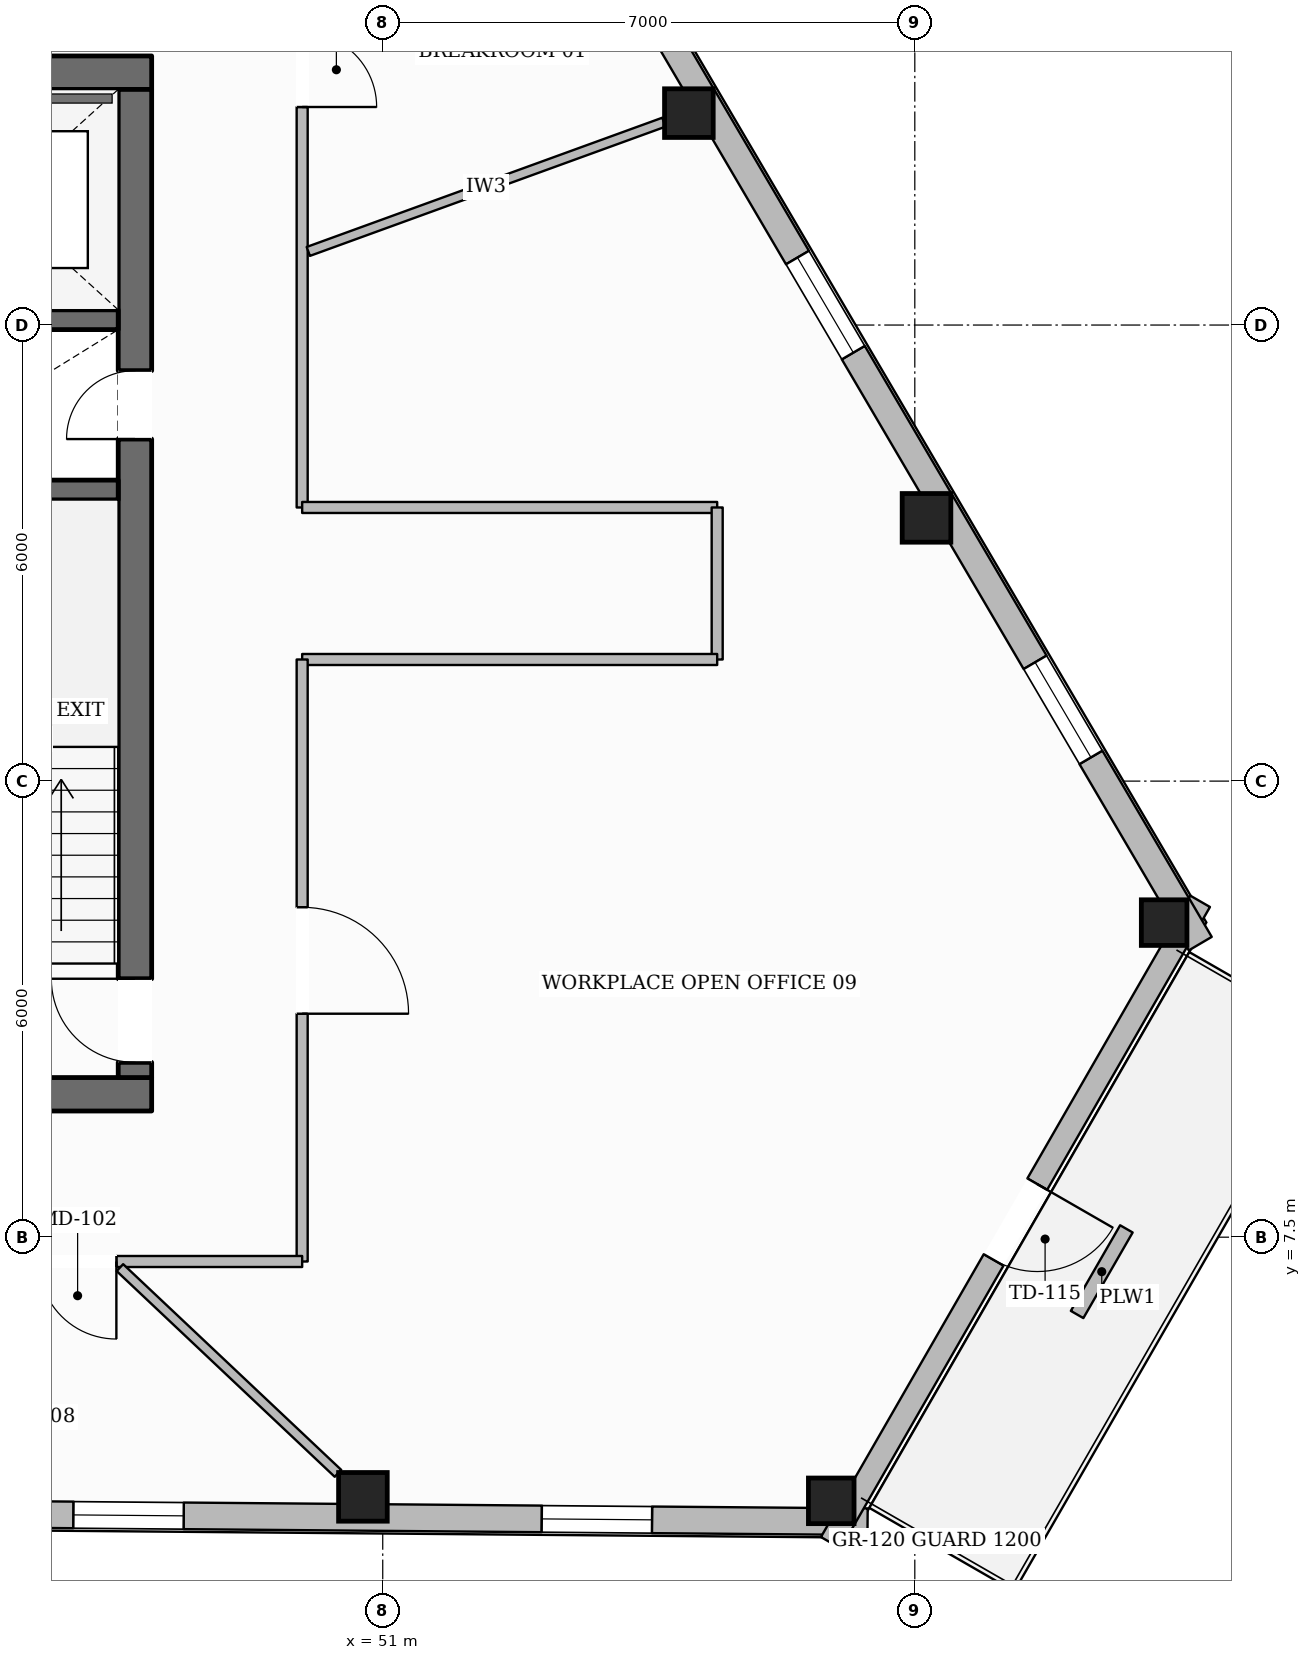
"""IFC4 building model, lengths in metres.
Left out: names, types, materials, properties, quantities, classifications, styles, units other than length and angle.
Written with IfcOpenShell. Run it as: python <this file> out.ifc"""

import sys

from ifc_helpers import new_model, si_unit, direction, frame, frame_2d, origin, origin_2d, place, context, subcontext, project, spatial, rectangle, hollow_rectangle, extrude, element, fill, save


model = new_model("IFC4")
c1 = context("Model", 3, precision=1e-05, world=origin(), true_north=direction((0.0, 1.0)))
c2 = subcontext(c1, "Body", "Model", "MODEL_VIEW")
j1 = project(units=[si_unit("LENGTHUNIT", "METRE"), si_unit("PLANEANGLEUNIT", "RADIAN")], contexts=[c1])
p1 = place(None, origin())
s1 = spatial("IfcSite", under=j1, at=p1, CompositionType="ELEMENT")
p2 = place(p1, origin())
s2 = spatial("IfcBuilding", under=s1, at=p2, CompositionType="ELEMENT")
p3 = place(p2, frame((0.0, 0.0, 191.95)))
s3 = spatial("IfcBuildingStorey", under=s2, at=p3, CompositionType="ELEMENT", Elevation=191.95)
p4 = place(p3, frame((28.04, 9.38, 0.0), z_axis=(0.0, 0.0, 1.0), x_axis=(1.0, 0.0, 0.0)))
e1 = element("IfcWall", 1, at=p4, inside=s3, PredefinedType="SOLIDWALL", context=c2, shape_type="SweptSolid", body=[
    extrude(rectangle(XDim=19.92, YDim=0.44, at=frame_2d((9.96, 0.0))), origin(), (0.0, 0.0, 1.0), 3.6),
])
p5 = place(p4, frame((10.46, 0.0, 0.0)))
e2 = element("IfcOpeningElement", 2, at=p5, cuts=e1, PredefinedType="OPENING", context=c2, shape_type="SweptSolid", body=[
    extrude(rectangle(XDim=1.4, YDim=2.2, at=frame_2d((0.7, 1.1))), frame((0.0, 0.23, 0.0), z_axis=(0.0, -1.0, 0.0), x_axis=(1.0, 0.0, 0.0)), (0.0, 0.0, 1.0), 0.46),
])
p6 = place(p3, frame((28.04, 22.82, 0.0), z_axis=(0.0, 0.0, 1.0), x_axis=(1.0, 0.0, 0.0)))
e3 = element("IfcWall", 3, at=p6, inside=s3, PredefinedType="SOLIDWALL", context=c2, shape_type="SweptSolid", body=[
    extrude(rectangle(XDim=19.92, YDim=0.44, at=frame_2d((9.96, 0.0))), origin(), (0.0, 0.0, 1.0), 3.6),
])
p7 = place(p6, frame((6.235, 0.0, 0.0)))
e4 = element("IfcOpeningElement", 4, at=p7, cuts=e3, PredefinedType="OPENING", context=c2, shape_type="SweptSolid", body=[
    extrude(rectangle(XDim=1.05, YDim=2.15, at=frame_2d((0.525, 1.075))), frame((0.0, 0.23, 0.0), z_axis=(0.0, -1.0, 0.0), x_axis=(1.0, 0.0, 0.0)), (0.0, 0.0, 1.0), 0.46),
])
p8 = place(p6, frame((12.635, 0.0, 0.0)))
e5 = element("IfcOpeningElement", 5, at=p8, cuts=e3, PredefinedType="OPENING", context=c2, shape_type="SweptSolid", body=[
    extrude(rectangle(XDim=1.05, YDim=2.15, at=frame_2d((0.525, 1.075))), frame((0.0, 0.23, 0.0), z_axis=(0.0, -1.0, 0.0), x_axis=(1.0, 0.0, 0.0)), (0.0, 0.0, 1.0), 0.46),
])
p9 = place(p3, frame((47.74, 9.6, 0.0), z_axis=(0.0, 0.0, 1.0), x_axis=(0.0, 1.0, 0.0)))
e6 = element("IfcWall", 6, at=p9, inside=s3, PredefinedType="SOLIDWALL", context=c2, shape_type="SweptSolid", body=[
    extrude(rectangle(XDim=13.0, YDim=0.44, at=frame_2d((6.5, 0.0))), origin(), (0.0, 0.0, 1.0), 3.6),
])
p10 = place(p9, frame((0.2, 0.0, 0.0)))
e7 = element("IfcOpeningElement", 7, at=p10, cuts=e6, PredefinedType="OPENING", context=c2, shape_type="SweptSolid", body=[
    extrude(rectangle(XDim=1.1, YDim=2.15, at=frame_2d((0.55, 1.075))), frame((0.0, 0.23, 0.0), z_axis=(0.0, -1.0, 0.0), x_axis=(1.0, 0.0, 0.0)), (0.0, 0.0, 1.0), 0.46),
])
p11 = place(p9, frame((8.4, 0.0, 0.0)))
e8 = element("IfcOpeningElement", 8, at=p11, cuts=e6, PredefinedType="OPENING", context=c2, shape_type="SweptSolid", body=[
    extrude(rectangle(XDim=0.9, YDim=2.1, at=frame_2d((0.45, 1.05))), frame((0.0, 0.23, 0.0), z_axis=(0.0, -1.0, 0.0), x_axis=(1.0, 0.0, 0.0)), (0.0, 0.0, 1.0), 0.46),
])
for number, where, z_axis, x_axis in (
    (9, (44.32, 17.33, 0.0), (0.0, 0.0, 1.0), (1.0, 0.0, 0.0)),
    (10, (44.32, 19.57, 0.0), (0.0, 0.0, 1.0), (1.0, 0.0, 0.0)),
):
    element("IfcWall", number, at=place(p3, frame(where, z_axis=z_axis, x_axis=x_axis)), inside=s3, PredefinedType="SHEAR", context=c2, shape_type="SweptSolid", body=[
        extrude(rectangle(XDim=3.2, YDim=0.26, at=frame_2d((1.6, 0.0))), origin(), (0.0, 0.0, 1.0), 3.6),
    ])
p12 = place(p3, frame((50.739, 4.084, 0.0), z_axis=(0.0, 0.0, 1.0), x_axis=(1.0, 0.0, 0.0)))
e11 = element("IfcColumn", 11, at=p12, inside=s3, PredefinedType="COLUMN", context=c2, shape_type="SweptSolid", body=[
    extrude(hollow_rectangle(XDim=0.64, YDim=0.64, WallThickness=0.028, at=origin_2d()), origin(), (0.0, 0.0, 1.0), 3.6),
])
for number, where, z_axis, x_axis in (
    (12, (56.901, 4.031, 0.0), (0.0, 0.0, 1.0), (1.0, 0.0, 0.0)),
    (13, (61.28, 11.638, 0.0), (0.0, 0.0, 1.0), (1.0, 0.0, 0.0)),
):
    element("IfcColumn", number, at=place(p3, frame(where, z_axis=z_axis, x_axis=x_axis)), inside=s3, PredefinedType="COLUMN", context=c2, shape_type="SweptSolid", body=[
        extrude(hollow_rectangle(XDim=0.6, YDim=0.6, WallThickness=0.028, at=origin_2d()), origin(), (0.0, 0.0, 1.0), 3.6),
    ])
for number, where, z_axis, x_axis in (
    (14, (58.154, 16.963, 0.0), (0.0, 0.0, 1.0), (1.0, 0.0, 0.0)),
    (15, (55.028, 22.288, 0.0), (0.0, 0.0, 1.0), (1.0, 0.0, 0.0)),
):
    element("IfcColumn", number, at=place(p3, frame(where, z_axis=z_axis, x_axis=x_axis)), inside=s3, PredefinedType="COLUMN", context=c2, shape_type="SweptSolid", body=[
        extrude(hollow_rectangle(XDim=0.64, YDim=0.64, WallThickness=0.028, at=origin_2d()), origin(), (0.0, 0.0, 1.0), 3.6),
    ])
p13 = place(p3, frame((57.379, 3.757, 0.0), z_axis=(0.0, 0.0, 1.0), x_axis=(-0.999963726544, 0.008517370208, 0.0)))
e16 = element("IfcWall", 16, at=p13, inside=s3, PredefinedType="STANDARD", context=c2, shape_type="SweptSolid", body=[
    extrude(rectangle(XDim=37.922, YDim=0.35, at=frame_2d((18.961, 0.0))), origin(), (0.0, 0.0, 1.0), 3.132),
])
p14 = place(p13, frame((27.842, 0.0, 0.0)))
e17 = element("IfcOpeningElement", 17, at=p14, cuts=e16, PredefinedType="OPENING", context=c2, shape_type="SweptSolid", body=[
    extrude(rectangle(XDim=1.0, YDim=2.2, at=frame_2d((0.5, 1.1))), frame((0.0, 0.185, 0.0), z_axis=(0.0, -1.0, 0.0), x_axis=(1.0, 0.0, 0.0)), (0.0, 0.0, 1.0), 0.37),
])
p15 = place(p13, frame((33.644, 0.0, 0.65)))
e18 = element("IfcOpeningElement", 18, at=p15, cuts=e16, PredefinedType="OPENING", context=c2, shape_type="SweptSolid", body=[
    extrude(rectangle(XDim=1.45, YDim=1.75, at=frame_2d((0.725, 0.875))), frame((0.0, 0.185, 0.0), z_axis=(0.0, -1.0, 0.0), x_axis=(1.0, 0.0, 0.0)), (0.0, 0.0, 1.0), 0.37),
])
p16 = place(p13, frame((21.321, 0.0, 0.65)))
e19 = element("IfcOpeningElement", 19, at=p16, cuts=e16, PredefinedType="OPENING", context=c2, shape_type="SweptSolid", body=[
    extrude(rectangle(XDim=1.45, YDim=1.75, at=frame_2d((0.725, 0.875))), frame((0.0, 0.185, 0.0), z_axis=(0.0, -1.0, 0.0), x_axis=(1.0, 0.0, 0.0)), (0.0, 0.0, 1.0), 0.37),
])
p17 = place(p13, frame((8.998, 0.0, 0.65)))
e20 = element("IfcOpeningElement", 20, at=p17, cuts=e16, PredefinedType="OPENING", context=c2, shape_type="SweptSolid", body=[
    extrude(rectangle(XDim=1.45, YDim=1.75, at=frame_2d((0.725, 0.875))), frame((0.0, 0.185, 0.0), z_axis=(0.0, -1.0, 0.0), x_axis=(1.0, 0.0, 0.0)), (0.0, 0.0, 1.0), 0.37),
])
p18 = place(p13, frame((2.836, 0.0, 0.65)))
e21 = element("IfcOpeningElement", 21, at=p18, cuts=e16, PredefinedType="OPENING", context=c2, shape_type="SweptSolid", body=[
    extrude(rectangle(XDim=1.45, YDim=1.75, at=frame_2d((0.725, 0.875))), frame((0.0, 0.185, 0.0), z_axis=(0.0, -1.0, 0.0), x_axis=(1.0, 0.0, 0.0)), (0.0, 0.0, 1.0), 0.37),
])
p19 = place(p3, frame((61.753, 11.919, 0.0), z_axis=(0.0, 0.0, 1.0), x_axis=(-0.498955314761, -0.866627713538, 0.0)))
e22 = element("IfcWall", 22, at=p19, inside=s3, PredefinedType="STANDARD", context=c2, shape_type="SweptSolid", body=[
    extrude(rectangle(XDim=9.737, YDim=0.3, at=frame_2d((4.869, 0.0))), origin(), (0.0, 0.0, 1.0), 3.132),
])
p20 = place(p19, frame((4.294, 0.0, 0.0)))
e23 = element("IfcOpeningElement", 23, at=p20, cuts=e22, PredefinedType="OPENING", context=c2, shape_type="SweptSolid", body=[
    extrude(rectangle(XDim=1.15, YDim=2.2, at=frame_2d((0.575, 1.1))), frame((0.0, 0.16, 0.0), z_axis=(0.0, -1.0, 0.0), x_axis=(1.0, 0.0, 0.0)), (0.0, 0.0, 1.0), 0.32),
])
p21 = place(p3, frame((42.516, 44.131, 0.0), z_axis=(0.0, 0.0, 1.0), x_axis=(0.506310158323, -0.862351450152, 0.0)))
e24 = element("IfcWall", 24, at=p21, inside=s3, PredefinedType="STANDARD", context=c2, shape_type="SweptSolid", body=[
    extrude(rectangle(XDim=38.0, YDim=0.35, at=frame_2d((19.0, 0.0))), origin(), (0.0, 0.0, 1.0), 3.132),
])
p22 = place(p21, frame((33.708, 0.0, 0.65)))
e25 = element("IfcOpeningElement", 25, at=p22, cuts=e24, PredefinedType="OPENING", context=c2, shape_type="SweptSolid", body=[
    extrude(rectangle(XDim=1.45, YDim=1.75, at=frame_2d((0.725, 0.875))), frame((0.0, 0.185, 0.0), z_axis=(0.0, -1.0, 0.0), x_axis=(1.0, 0.0, 0.0)), (0.0, 0.0, 1.0), 0.37),
])
p23 = place(p21, frame((27.534, 0.0, 0.65)))
e26 = element("IfcOpeningElement", 26, at=p23, cuts=e24, PredefinedType="OPENING", context=c2, shape_type="SweptSolid", body=[
    extrude(rectangle(XDim=1.45, YDim=1.75, at=frame_2d((0.725, 0.875))), frame((0.0, 0.185, 0.0), z_axis=(0.0, -1.0, 0.0), x_axis=(1.0, 0.0, 0.0)), (0.0, 0.0, 1.0), 0.37),
])
p24 = place(p21, frame((21.359, 0.0, 0.65)))
e27 = element("IfcOpeningElement", 27, at=p24, cuts=e24, PredefinedType="OPENING", context=c2, shape_type="SweptSolid", body=[
    extrude(rectangle(XDim=1.45, YDim=1.75, at=frame_2d((0.725, 0.875))), frame((0.0, 0.185, 0.0), z_axis=(0.0, -1.0, 0.0), x_axis=(1.0, 0.0, 0.0)), (0.0, 0.0, 1.0), 0.37),
])
p25 = place(p21, frame((9.009, 0.0, 0.65)))
e28 = element("IfcOpeningElement", 28, at=p25, cuts=e24, PredefinedType="OPENING", context=c2, shape_type="SweptSolid", body=[
    extrude(rectangle(XDim=1.45, YDim=1.75, at=frame_2d((0.725, 0.875))), frame((0.0, 0.185, 0.0), z_axis=(0.0, -1.0, 0.0), x_axis=(1.0, 0.0, 0.0)), (0.0, 0.0, 1.0), 0.37),
])
p26 = place(p21, frame((2.834, 0.0, 0.65)))
e29 = element("IfcOpeningElement", 29, at=p26, cuts=e24, PredefinedType="OPENING", context=c2, shape_type="SweptSolid", body=[
    extrude(rectangle(XDim=1.45, YDim=1.75, at=frame_2d((0.725, 0.875))), frame((0.0, 0.185, 0.0), z_axis=(0.0, -1.0, 0.0), x_axis=(1.0, 0.0, 0.0)), (0.0, 0.0, 1.0), 0.37),
])
p27 = place(p3, frame((60.135, 6.483, 0.0), z_axis=(0.0, 0.0, 1.0), x_axis=(0.49894734977, 0.866632299281, 0.0)))
e30 = element("IfcWall", 30, at=p27, inside=s3, PredefinedType="USERDEFINED", context=c2, shape_type="SweptSolid", body=[
    extrude(rectangle(XDim=1.3, YDim=0.19, at=frame_2d((0.65, 0.0))), origin(), (0.0, 0.0, 1.0), 0.52),
])
p28 = place(p3, frame((49.94, 25.02, 0.0), z_axis=(0.0, 0.0, 1.0), x_axis=(0.0, -1.0, 0.0)))
e31 = element("IfcWall", 31, at=p28, inside=s3, PredefinedType="PARTITIONING", context=c2, shape_type="SweptSolid", body=[
    extrude(rectangle(XDim=7.92, YDim=0.145, at=frame_2d((3.96, 0.0))), origin(), (0.0, 0.0, 1.0), 3.339),
])
p29 = place(p28, frame((1.671, 0.0, 0.0)))
e32 = element("IfcOpeningElement", 32, at=p29, cuts=e31, PredefinedType="OPENING", context=c2, shape_type="SweptSolid", body=[
    extrude(rectangle(XDim=0.98, YDim=2.15, at=frame_2d((0.49, 1.075))), frame((0.0, 0.083, 0.0), z_axis=(0.0, -1.0, 0.0), x_axis=(1.0, 0.0, 0.0)), (0.0, 0.0, 1.0), 0.165),
])
p30 = place(p3, frame((49.94, 17.1, 0.0), z_axis=(0.0, 0.0, 1.0), x_axis=(1.0, 0.0, 0.0)))
e33 = element("IfcWall", 33, at=p30, inside=s3, PredefinedType="PARTITIONING", context=c2, shape_type="SweptSolid", body=[
    extrude(rectangle(XDim=5.46, YDim=0.145, at=frame_2d((2.73, 0.0))), origin(), (0.0, 0.0, 1.0), 3.141),
])
p31 = place(p3, frame((55.4, 17.1, 0.0), z_axis=(0.0, 0.0, 1.0), x_axis=(0.0, -1.0, 0.0)))
e34 = element("IfcWall", 34, at=p31, inside=s3, PredefinedType="PARTITIONING", context=c2, shape_type="SweptSolid", body=[
    extrude(rectangle(XDim=2.0, YDim=0.145, at=frame_2d((1.0, 0.0))), origin(), (0.0, 0.0, 1.0), 3.339),
])
p32 = place(p3, frame((55.4, 15.1, 0.0), z_axis=(0.0, 0.0, 1.0), x_axis=(-1.0, 0.0, 0.0)))
e35 = element("IfcWall", 35, at=p32, inside=s3, PredefinedType="PARTITIONING", context=c2, shape_type="SweptSolid", body=[
    extrude(rectangle(XDim=5.46, YDim=0.145, at=frame_2d((2.73, 0.0))), origin(), (0.0, 0.0, 1.0), 3.6),
])
p33 = place(p3, frame((49.94, 15.1, 0.0), z_axis=(0.0, 0.0, 1.0), x_axis=(0.0, -1.0, 0.0)))
e36 = element("IfcWall", 36, at=p33, inside=s3, PredefinedType="PARTITIONING", context=c2, shape_type="SweptSolid", body=[
    extrude(rectangle(XDim=7.92, YDim=0.145, at=frame_2d((3.96, 0.0))), origin(), (0.0, 0.0, 1.0), 3.6),
])
p34 = place(p33, frame((3.26, 0.0, 0.0)))
e37 = element("IfcOpeningElement", 37, at=p34, cuts=e36, PredefinedType="OPENING", context=c2, shape_type="SweptSolid", body=[
    extrude(rectangle(XDim=1.4, YDim=2.2, at=frame_2d((0.7, 1.1))), frame((0.0, 0.083, 0.0), z_axis=(0.0, -1.0, 0.0), x_axis=(1.0, 0.0, 0.0)), (0.0, 0.0, 1.0), 0.165),
])
p35 = place(p3, frame((49.94, 7.18, 0.0), z_axis=(0.0, 0.0, 1.0), x_axis=(-1.0, 0.0, 0.0)))
e38 = element("IfcWall", 38, at=p35, inside=s3, PredefinedType="PARTITIONING", context=c2, shape_type="SweptSolid", body=[
    extrude(rectangle(XDim=23.88, YDim=0.145, at=frame_2d((11.94, 0.0))), origin(), (0.0, 0.0, 1.0), 3.6),
])
p36 = place(p35, frame((19.715, 0.0, 0.0)))
e39 = element("IfcOpeningElement", 39, at=p36, cuts=e38, PredefinedType="OPENING", context=c2, shape_type="SweptSolid", body=[
    extrude(rectangle(XDim=0.98, YDim=2.15, at=frame_2d((0.49, 1.075))), frame((0.0, 0.083, 0.0), z_axis=(0.0, -1.0, 0.0), x_axis=(1.0, 0.0, 0.0)), (0.0, 0.0, 1.0), 0.165),
])
p37 = place(p35, frame((9.816, 0.0, 0.0)))
e40 = element("IfcOpeningElement", 40, at=p37, cuts=e38, PredefinedType="OPENING", context=c2, shape_type="SweptSolid", body=[
    extrude(rectangle(XDim=0.98, YDim=2.15, at=frame_2d((0.49, 1.075))), frame((0.0, 0.083, 0.0), z_axis=(0.0, -1.0, 0.0), x_axis=(1.0, 0.0, 0.0)), (0.0, 0.0, 1.0), 0.165),
])
p38 = place(p35, frame((2.444, 0.0, 0.0)))
e41 = element("IfcOpeningElement", 41, at=p38, cuts=e38, PredefinedType="OPENING", context=c2, shape_type="SweptSolid", body=[
    extrude(rectangle(XDim=1.02, YDim=2.15, at=frame_2d((0.51, 1.075))), frame((0.0, 0.083, 0.0), z_axis=(0.0, -1.0, 0.0), x_axis=(1.0, 0.0, 0.0)), (0.0, 0.0, 1.0), 0.165),
])
p39 = place(p3, frame((50.021, 20.469, 0.0), z_axis=(0.0, 0.0, 1.0), x_axis=(0.939863560333, 0.341550125103, 0.0)))
e42 = element("IfcWall", 42, at=p39, inside=s3, PredefinedType="PARTITIONING", context=c2, shape_type="SweptSolid", body=[
    extrude(rectangle(XDim=4.979, YDim=0.125, at=frame_2d((2.489, 0.0))), origin(), (0.0, 0.0, 1.0), 3.6),
])
p40 = place(p3, frame((47.542, 7.1, 0.0), z_axis=(0.0, 0.0, 1.0), x_axis=(0.727449032528, -0.68616171933, 0.0)))
e43 = element("IfcWall", 43, at=p40, inside=s3, PredefinedType="PARTITIONING", context=c2, shape_type="SweptSolid", body=[
    extrude(rectangle(XDim=3.944, YDim=0.125, at=frame_2d((1.972, 0.0))), origin(), (0.0, 0.0, 1.0), 3.6),
])
p41 = place(p20, origin())
e44 = element("IfcDoor", 44, at=p41, inside=s3, OperationType="SINGLE_SWING_LEFT", PredefinedType="DOOR", context=c2, shape_type="SweptSolid", body=[
    extrude(rectangle(XDim=1.15, YDim=2.2, at=frame_2d((0.575, 1.1))), frame((0.0, 0.025, 0.0), z_axis=(0.0, -1.0, 0.0), x_axis=(1.0, 0.0, 0.0)), (0.0, 0.0, 1.0), 0.05),
])
fill(e23, e44)
p42 = place(p17, origin())
e45 = element("IfcWindow", 45, at=p42, inside=s3, PartitioningType="SINGLE_PANEL", PredefinedType="WINDOW", context=c2, shape_type="SweptSolid", body=[
    extrude(rectangle(XDim=1.45, YDim=1.75, at=frame_2d((0.725, 0.875))), frame((0.0, 0.03, 0.0), z_axis=(0.0, -1.0, 0.0), x_axis=(1.0, 0.0, 0.0)), (0.0, 0.0, 1.0), 0.06),
])
fill(e20, e45)
p43 = place(p18, origin())
e46 = element("IfcWindow", 46, at=p43, inside=s3, PartitioningType="SINGLE_PANEL", PredefinedType="WINDOW", context=c2, shape_type="SweptSolid", body=[
    extrude(rectangle(XDim=1.45, YDim=1.75, at=frame_2d((0.725, 0.875))), frame((0.0, 0.03, 0.0), z_axis=(0.0, -1.0, 0.0), x_axis=(1.0, 0.0, 0.0)), (0.0, 0.0, 1.0), 0.06),
])
fill(e21, e46)
p44 = place(p22, origin())
e47 = element("IfcWindow", 47, at=p44, inside=s3, PartitioningType="SINGLE_PANEL", PredefinedType="WINDOW", context=c2, shape_type="SweptSolid", body=[
    extrude(rectangle(XDim=1.45, YDim=1.75, at=frame_2d((0.725, 0.875))), frame((0.0, 0.03, 0.0), z_axis=(0.0, -1.0, 0.0), x_axis=(1.0, 0.0, 0.0)), (0.0, 0.0, 1.0), 0.06),
])
fill(e25, e47)
p45 = place(p23, origin())
e48 = element("IfcWindow", 48, at=p45, inside=s3, PartitioningType="SINGLE_PANEL", PredefinedType="WINDOW", context=c2, shape_type="SweptSolid", body=[
    extrude(rectangle(XDim=1.45, YDim=1.75, at=frame_2d((0.725, 0.875))), frame((0.0, 0.03, 0.0), z_axis=(0.0, -1.0, 0.0), x_axis=(1.0, 0.0, 0.0)), (0.0, 0.0, 1.0), 0.06),
])
fill(e26, e48)
p46 = place(p10, origin())
e49 = element("IfcDoor", 49, at=p46, inside=s3, OperationType="SINGLE_SWING_RIGHT", PredefinedType="DOOR", context=c2, shape_type="SweptSolid", body=[
    extrude(rectangle(XDim=1.1, YDim=2.15, at=frame_2d((0.55, 1.075))), frame((0.0, 0.025, 0.0), z_axis=(0.0, -1.0, 0.0), x_axis=(1.0, 0.0, 0.0)), (0.0, 0.0, 1.0), 0.05),
])
fill(e7, e49)
p47 = place(p11, origin())
e50 = element("IfcDoor", 50, at=p47, inside=s3, OperationType="SINGLE_SWING_LEFT", PredefinedType="DOOR", context=c2, shape_type="SweptSolid", body=[
    extrude(rectangle(XDim=0.9, YDim=2.1, at=frame_2d((0.45, 1.05))), frame((0.0, 0.025, 0.0), z_axis=(0.0, -1.0, 0.0), x_axis=(1.0, 0.0, 0.0)), (0.0, 0.0, 1.0), 0.05),
])
fill(e8, e50)
p48 = place(p29, origin())
e51 = element("IfcDoor", 51, at=p48, inside=s3, OperationType="SINGLE_SWING_RIGHT", PredefinedType="DOOR", context=c2, shape_type="SweptSolid", body=[
    extrude(rectangle(XDim=0.98, YDim=2.15, at=frame_2d((0.49, 1.075))), frame((0.0, 0.025, 0.0), z_axis=(0.0, -1.0, 0.0), x_axis=(1.0, 0.0, 0.0)), (0.0, 0.0, 1.0), 0.05),
])
fill(e32, e51)
p49 = place(p38, origin())
e52 = element("IfcDoor", 52, at=p49, inside=s3, OperationType="SINGLE_SWING_LEFT", PredefinedType="DOOR", context=c2, shape_type="SweptSolid", body=[
    extrude(rectangle(XDim=1.02, YDim=2.15, at=frame_2d((0.51, 1.075))), frame((0.0, 0.025, 0.0), z_axis=(0.0, -1.0, 0.0), x_axis=(1.0, 0.0, 0.0)), (0.0, 0.0, 1.0), 0.05),
])
fill(e41, e52)
p50 = place(p34, origin())
e53 = element("IfcDoor", 53, at=p50, inside=s3, OperationType="SINGLE_SWING_RIGHT", PredefinedType="DOOR", context=c2, shape_type="SweptSolid", body=[
    extrude(rectangle(XDim=1.4, YDim=2.2, at=frame_2d((0.7, 1.1))), frame((0.0, 0.025, 0.0), z_axis=(0.0, -1.0, 0.0), x_axis=(1.0, 0.0, 0.0)), (0.0, 0.0, 1.0), 0.05),
])
fill(e37, e53)
save(model, sys.argv[1])
